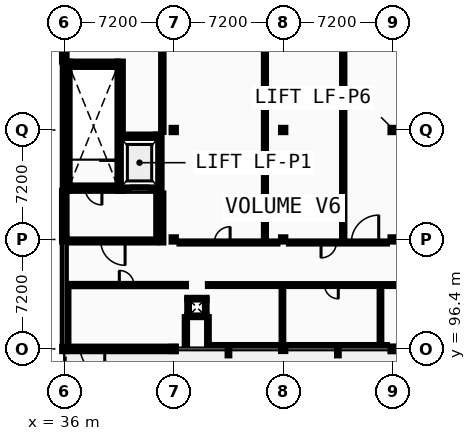
"""IFC4 building model, lengths in metres.
Left out: names, types, materials, properties, quantities, classifications, styles, units other than length and angle.
Written with IfcOpenShell. Run it as: python <this file> out.ifc"""

import sys

from ifc_helpers import new_model, si_unit, direction, frame, frame_2d, origin, origin_2d, place, context, subcontext, project, spatial, rectangle, i_section, extrude, element, fill, save


model = new_model("IFC4")
c1 = context("Model", 3, precision=1e-05, world=origin(), true_north=direction((0.0, 1.0)))
c2 = subcontext(c1, "Body", "Model", "MODEL_VIEW")
j1 = project(units=[si_unit("LENGTHUNIT", "METRE"), si_unit("PLANEANGLEUNIT", "RADIAN")], contexts=[c1])
p1 = place(None, origin())
s1 = spatial("IfcSite", under=j1, at=p1, CompositionType="ELEMENT")
p2 = place(p1, origin())
s2 = spatial("IfcBuilding", under=s1, at=p2, CompositionType="ELEMENT")
p3 = place(p2, frame((0.0, 0.0, 22.8)))
s3 = spatial("IfcBuildingStorey", under=s2, at=p3, CompositionType="ELEMENT", Elevation=22.8)
for number, where, z_axis, x_axis in (
    (1, (36.0, 96.4, 0.0), (0.0, 0.0, 1.0), (1.0, 0.0, 0.0)),
    (2, (36.0, 103.6, 0.0), (0.0, 0.0, 1.0), (1.0, 0.0, 0.0)),
    (3, (43.2, 96.4, 0.0), (0.0, 0.0, 1.0), (1.0, 0.0, 0.0)),
    (4, (43.2, 103.6, 0.0), (0.0, 0.0, 1.0), (1.0, 0.0, 0.0)),
    (5, (43.2, 110.8, 0.0), (0.0, 0.0, 1.0), (1.0, 0.0, 0.0)),
    (6, (50.4, 96.4, 0.0), (0.0, 0.0, 1.0), (1.0, 0.0, 0.0)),
    (7, (50.4, 103.6, 0.0), (0.0, 0.0, 1.0), (1.0, 0.0, 0.0)),
    (8, (50.4, 110.8, 0.0), (0.0, 0.0, 1.0), (1.0, 0.0, 0.0)),
    (9, (57.6, 96.4, 0.0), (0.0, 0.0, 1.0), (1.0, 0.0, 0.0)),
    (10, (57.6, 103.6, 0.0), (0.0, 0.0, 1.0), (1.0, 0.0, 0.0)),
    (11, (57.6, 110.8, 0.0), (0.0, 0.0, 1.0), (1.0, 0.0, 0.0)),
):
    element("IfcColumn", number, at=place(p3, frame(where, z_axis=z_axis, x_axis=x_axis)), inside=s3, PredefinedType="COLUMN", context=c2, shape_type="SweptSolid", body=[
        extrude(i_section(OverallWidth=0.28, OverallDepth=0.28, WebThickness=0.01, FlangeThickness=0.018, FilletRadius=0.024, at=origin_2d()), origin(), (0.0, 0.0, 1.0), 4.4),
    ])
p4 = place(p3, frame((36.0, 96.4, 0.0), z_axis=(0.0, 0.0, 1.0), x_axis=(1.0, 0.0, 0.0)))
e12 = element("IfcWall", 12, at=p4, inside=s3, PredefinedType="STANDARD", context=c2, shape_type="SweptSolid", body=[
    extrude(rectangle(XDim=7.31, YDim=0.3, at=frame_2d((3.655, 0.0))), origin(), (0.0, 0.0, 1.0), 4.035),
])
p5 = place(p4, frame((1.062, 0.0, 0.0)))
e13 = element("IfcOpeningElement", 13, at=p5, cuts=e12, PredefinedType="OPENING", context=c2, shape_type="SweptSolid", body=[
    extrude(rectangle(XDim=1.6, YDim=2.2, at=frame_2d((0.8, 1.1))), frame((0.0, 0.16, 0.0), z_axis=(0.0, -1.0, 0.0), x_axis=(1.0, 0.0, 0.0)), (0.0, 0.0, 1.0), 0.32),
])
p6 = place(p3, frame((57.49, 96.4, 0.0), z_axis=(0.0, 0.0, 1.0), x_axis=(1.0, 0.0, 0.0)))
e14 = element("IfcWall", 14, at=p6, inside=s3, PredefinedType="STANDARD", context=c2, shape_type="SweptSolid", body=[
    extrude(rectangle(XDim=7.31, YDim=0.3, at=frame_2d((3.655, 0.0))), origin(), (0.0, 0.0, 1.0), 4.035),
])
p7 = place(p3, frame((36.0, 106.8, 0.0), z_axis=(0.0, 0.0, 1.0), x_axis=(0.0, -1.0, 0.0)))
e15 = element("IfcWall", 15, at=p7, inside=s3, PredefinedType="STANDARD", context=c2, shape_type="SweptSolid", body=[
    extrude(rectangle(XDim=3.2, YDim=0.3, at=frame_2d((1.6, 0.0))), origin(), (0.0, 0.0, 1.0), 4.11),
])
p8 = place(p7, frame((1.034, 0.0, 0.95)))
e16 = element("IfcOpeningElement", 16, at=p8, cuts=e15, PredefinedType="OPENING", context=c2, shape_type="SweptSolid", body=[
    extrude(rectangle(XDim=1.132, YDim=1.296, at=frame_2d((0.566, 0.648))), frame((0.0, 0.16, 0.0), z_axis=(0.0, -1.0, 0.0), x_axis=(1.0, 0.0, 0.0)), (0.0, 0.0, 1.0), 0.32),
])
p9 = place(p3, frame((36.0, 117.85, 0.0), z_axis=(0.0, 0.0, 1.0), x_axis=(0.0, -1.0, 0.0)))
e17 = element("IfcWall", 17, at=p9, inside=s3, PredefinedType="STANDARD", context=c2, shape_type="SweptSolid", body=[
    extrude(rectangle(XDim=2.55, YDim=0.3, at=frame_2d((1.275, 0.0))), origin(), (0.0, 0.0, 1.0), 4.11),
])
p10 = place(p3, frame((36.0, 96.6, 4.4), z_axis=(0.0, 0.0, 1.0), x_axis=(0.0, 1.0, 0.0)))
e18 = element("IfcWall", 18, at=p10, inside=s3, PredefinedType="PARAPET", context=c2, shape_type="SweptSolid", body=[
    extrude(rectangle(XDim=21.2, YDim=0.2, at=frame_2d((10.6, 0.0))), origin(), (0.0, 0.0, 1.0), 0.55),
])
p11 = place(p3, frame((36.35, 106.975, 0.0), z_axis=(0.0, 0.0, 1.0), x_axis=(1.0, 0.0, 0.0)))
e19 = element("IfcWall", 19, at=p11, inside=s3, PredefinedType="SHEAR", context=c2, shape_type="SweptSolid", body=[
    extrude(rectangle(XDim=3.15, YDim=0.35, at=frame_2d((1.575, 0.0))), origin(), (0.0, 0.0, 1.0), 4.18),
])
p12 = place(p11, frame((1.025, 0.0, 0.0)))
e20 = element("IfcOpeningElement", 20, at=p12, cuts=e19, PredefinedType="OPENING", context=c2, shape_type="SweptSolid", body=[
    extrude(rectangle(XDim=1.1, YDim=2.15, at=frame_2d((0.55, 1.075))), frame((0.0, 0.185, 0.0), z_axis=(0.0, -1.0, 0.0), x_axis=(1.0, 0.0, 0.0)), (0.0, 0.0, 1.0), 0.37),
])
p13 = place(p3, frame((36.35, 115.125, 0.0), z_axis=(0.0, 0.0, 1.0), x_axis=(1.0, 0.0, 0.0)))
e21 = element("IfcWall", 21, at=p13, inside=s3, PredefinedType="SHEAR", context=c2, shape_type="SweptSolid", body=[
    extrude(rectangle(XDim=3.15, YDim=0.35, at=frame_2d((1.575, 0.0))), origin(), (0.0, 0.0, 1.0), 4.18),
])
for number, where, z_axis, x_axis in (
    (22, (36.175, 106.8, 0.0), (0.0, 0.0, 1.0), (0.0, 1.0, 0.0)),
    (23, (39.675, 106.8, 0.0), (0.0, 0.0, 1.0), (0.0, 1.0, 0.0)),
):
    element("IfcWall", number, at=place(p3, frame(where, z_axis=z_axis, x_axis=x_axis)), inside=s3, PredefinedType="SHEAR", context=c2, shape_type="SweptSolid", body=[
        extrude(rectangle(XDim=8.5, YDim=0.35, at=frame_2d((4.25, 0.0))), origin(), (0.0, 0.0, 1.0), 4.18),
    ])
p14 = place(p3, frame((39.85, 106.975, 0.0), z_axis=(0.0, 0.0, 1.0), x_axis=(1.0, 0.0, 0.0)))
e24 = element("IfcWall", 24, at=p14, inside=s3, PredefinedType="SHEAR", context=c2, shape_type="SweptSolid", body=[
    extrude(rectangle(XDim=2.2, YDim=0.35, at=frame_2d((1.1, 0.0))), origin(), (0.0, 0.0, 1.0), 4.18),
])
p15 = place(p14, frame((0.5, 0.0, 0.0)))
e25 = element("IfcOpeningElement", 25, at=p15, cuts=e24, PredefinedType="OPENING", context=c2, shape_type="SweptSolid", body=[
    extrude(rectangle(XDim=1.2, YDim=2.2, at=frame_2d((0.6, 1.1))), frame((0.0, 0.185, 0.0), z_axis=(0.0, -1.0, 0.0), x_axis=(1.0, 0.0, 0.0)), (0.0, 0.0, 1.0), 0.37),
])
p16 = place(p3, frame((39.85, 110.325, 0.0), z_axis=(0.0, 0.0, 1.0), x_axis=(1.0, 0.0, 0.0)))
e26 = element("IfcWall", 26, at=p16, inside=s3, PredefinedType="SHEAR", context=c2, shape_type="SweptSolid", body=[
    extrude(rectangle(XDim=2.2, YDim=0.35, at=frame_2d((1.1, 0.0))), origin(), (0.0, 0.0, 1.0), 4.18),
])
p17 = place(p3, frame((42.225, 106.8, 0.0), z_axis=(0.0, 0.0, 1.0), x_axis=(0.0, 1.0, 0.0)))
e27 = element("IfcWall", 27, at=p17, inside=s3, PredefinedType="SHEAR", context=c2, shape_type="SweptSolid", body=[
    extrude(rectangle(XDim=3.7, YDim=0.35, at=frame_2d((1.85, 0.0))), origin(), (0.0, 0.0, 1.0), 4.18),
])
p18 = place(p3, frame((36.35, 103.5, 0.0), z_axis=(0.0, 0.0, 1.0), x_axis=(1.0, 0.0, 0.0)))
e28 = element("IfcWall", 28, at=p18, inside=s3, PredefinedType="PARTITIONING", context=c2, shape_type="SweptSolid", body=[
    extrude(rectangle(XDim=5.7, YDim=0.2, at=frame_2d((2.85, 0.0))), origin(), (0.0, 0.0, 1.0), 4.035),
])
p19 = place(p18, frame((2.05, 0.0, 0.0)))
e29 = element("IfcOpeningElement", 29, at=p19, cuts=e28, PredefinedType="OPENING", context=c2, shape_type="SweptSolid", body=[
    extrude(rectangle(XDim=1.6, YDim=2.2, at=frame_2d((0.8, 1.1))), frame((0.0, 0.11, 0.0), z_axis=(0.0, -1.0, 0.0), x_axis=(1.0, 0.0, 0.0)), (0.0, 0.0, 1.0), 0.22),
])
p20 = place(p3, frame((42.15, 103.6, 0.0), z_axis=(0.0, 0.0, 1.0), x_axis=(0.0, 1.0, 0.0)))
e30 = element("IfcWall", 30, at=p20, inside=s3, PredefinedType="PARTITIONING", context=c2, shape_type="SweptSolid", body=[
    extrude(rectangle(XDim=3.2, YDim=0.2, at=frame_2d((1.6, 0.0))), origin(), (0.0, 0.0, 1.0), 4.18),
])
for number, where, z_axis, x_axis in (
    (31, (44.09, 98.545, 0.0), (0.0, 0.0, 1.0), (1.0, 0.0, 0.0)),
    (32, (44.09, 99.705, 0.0), (0.0, 0.0, 1.0), (1.0, 0.0, 0.0)),
):
    element("IfcWall", number, at=place(p3, frame(where, z_axis=z_axis, x_axis=x_axis)), inside=s3, PredefinedType="PARTITIONING", context=c2, shape_type="SweptSolid", body=[
        extrude(rectangle(XDim=1.27, YDim=0.11, at=frame_2d((0.635, 0.0))), origin(), (0.0, 0.0, 1.0), 4.18),
    ])
for number, where, z_axis, x_axis in (
    (33, (44.145, 98.6, 0.0), (0.0, 0.0, 1.0), (0.0, 1.0, 0.0)),
    (34, (45.305, 98.6, 0.0), (0.0, 0.0, 1.0), (0.0, 1.0, 0.0)),
):
    element("IfcWall", number, at=place(p3, frame(where, z_axis=z_axis, x_axis=x_axis)), inside=s3, PredefinedType="PARTITIONING", context=c2, shape_type="SweptSolid", body=[
        extrude(rectangle(XDim=1.05, YDim=0.11, at=frame_2d((0.525, 0.0))), origin(), (0.0, 0.0, 1.0), 4.18),
    ])
p21 = place(p3, frame((45.45, 96.6, 0.0), z_axis=(0.0, 0.0, 1.0), x_axis=(1.0, 0.0, 0.0)))
e35 = element("IfcWall", 35, at=p21, inside=s3, PredefinedType="PARTITIONING", context=c2, shape_type="SweptSolid", body=[
    extrude(rectangle(XDim=4.57, YDim=0.11, at=frame_2d((2.285, 0.0))), origin(), (0.0, 0.0, 1.0), 4.035),
])
p22 = place(p3, frame((50.78, 96.6, 0.0), z_axis=(0.0, 0.0, 1.0), x_axis=(1.0, 0.0, 0.0)))
e36 = element("IfcWall", 36, at=p22, inside=s3, PredefinedType="PARTITIONING", context=c2, shape_type="SweptSolid", body=[
    extrude(rectangle(XDim=6.44, YDim=0.11, at=frame_2d((3.22, 0.0))), origin(), (0.0, 0.0, 1.0), 4.035),
])
p23 = place(p3, frame((36.2, 100.6, 0.0), z_axis=(0.0, 0.0, 1.0), x_axis=(1.0, 0.0, 0.0)))
e37 = element("IfcWall", 37, at=p23, inside=s3, PredefinedType="PARTITIONING", context=c2, shape_type="SweptSolid", body=[
    extrude(rectangle(XDim=7.8, YDim=0.15, at=frame_2d((3.9, 0.0))), origin(), (0.0, 0.0, 1.0), 4.18),
])
p24 = place(p23, frame((3.421, 0.0, 0.0)))
e38 = element("IfcOpeningElement", 38, at=p24, cuts=e37, PredefinedType="OPENING", context=c2, shape_type="SweptSolid", body=[
    extrude(rectangle(XDim=0.958, YDim=2.096, at=frame_2d((0.479, 1.048))), frame((0.0, 0.085, 0.0), z_axis=(0.0, -1.0, 0.0), x_axis=(1.0, 0.0, 0.0)), (0.0, 0.0, 1.0), 0.17),
])
p25 = place(p3, frame((45.45, 100.6, 0.0), z_axis=(0.0, 0.0, 1.0), x_axis=(1.0, 0.0, 0.0)))
e39 = element("IfcWall", 39, at=p25, inside=s3, PredefinedType="PARTITIONING", context=c2, shape_type="SweptSolid", body=[
    extrude(rectangle(XDim=19.15, YDim=0.125, at=frame_2d((9.575, 0.0))), origin(), (0.0, 0.0, 1.0), 4.18),
])
p26 = place(p25, frame((0.45, 0.0, 0.0)))
e40 = element("IfcOpeningElement", 40, at=p26, cuts=e39, PredefinedType="OPENING", context=c2, shape_type="SweptSolid", body=[
    extrude(rectangle(XDim=1.0, YDim=2.1, at=frame_2d((0.5, 1.05))), frame((0.0, 0.073, 0.0), z_axis=(0.0, -1.0, 0.0), x_axis=(1.0, 0.0, 0.0)), (0.0, 0.0, 1.0), 0.145),
])
p27 = place(p25, frame((7.675, 0.0, 0.0)))
e41 = element("IfcOpeningElement", 41, at=p27, cuts=e39, PredefinedType="OPENING", context=c2, shape_type="SweptSolid", body=[
    extrude(rectangle(XDim=0.9, YDim=2.1, at=frame_2d((0.45, 1.05))), frame((0.0, 0.073, 0.0), z_axis=(0.0, -1.0, 0.0), x_axis=(1.0, 0.0, 0.0)), (0.0, 0.0, 1.0), 0.145),
])
p28 = place(p25, frame((14.758, 0.0, 0.0)))
e42 = element("IfcOpeningElement", 42, at=p28, cuts=e39, PredefinedType="OPENING", context=c2, shape_type="SweptSolid", body=[
    extrude(rectangle(XDim=0.984, YDim=2.096, at=frame_2d((0.492, 1.048))), frame((0.0, 0.073, 0.0), z_axis=(0.0, -1.0, 0.0), x_axis=(1.0, 0.0, 0.0)), (0.0, 0.0, 1.0), 0.145),
])
p29 = place(p3, frame((43.58, 103.4, 0.0), z_axis=(0.0, 0.0, 1.0), x_axis=(1.0, 0.0, 0.0)))
e43 = element("IfcWall", 43, at=p29, inside=s3, PredefinedType="PARTITIONING", context=c2, shape_type="SweptSolid", body=[
    extrude(rectangle(XDim=6.44, YDim=0.135, at=frame_2d((3.22, 0.0))), origin(), (0.0, 0.0, 1.0), 4.035),
])
p30 = place(p29, frame((2.292, 0.0, 0.0)))
e44 = element("IfcOpeningElement", 44, at=p30, cuts=e43, PredefinedType="OPENING", context=c2, shape_type="SweptSolid", body=[
    extrude(rectangle(XDim=1.036, YDim=2.096, at=frame_2d((0.518, 1.048))), frame((0.0, 0.078, 0.0), z_axis=(0.0, -1.0, 0.0), x_axis=(1.0, 0.0, 0.0)), (0.0, 0.0, 1.0), 0.155),
])
p31 = place(p3, frame((50.78, 103.4, 0.0), z_axis=(0.0, 0.0, 1.0), x_axis=(1.0, 0.0, 0.0)))
e45 = element("IfcWall", 45, at=p31, inside=s3, PredefinedType="PARTITIONING", context=c2, shape_type="SweptSolid", body=[
    extrude(rectangle(XDim=6.44, YDim=0.135, at=frame_2d((3.22, 0.0))), origin(), (0.0, 0.0, 1.0), 4.035),
])
p32 = place(p31, frame((4.105, 0.0, 0.0)))
e46 = element("IfcOpeningElement", 46, at=p32, cuts=e45, PredefinedType="OPENING", context=c2, shape_type="SweptSolid", body=[
    extrude(rectangle(XDim=1.8, YDim=2.3, at=frame_2d((0.9, 1.15))), frame((0.0, 0.078, 0.0), z_axis=(0.0, -1.0, 0.0), x_axis=(1.0, 0.0, 0.0)), (0.0, 0.0, 1.0), 0.155),
])
p33 = place(p31, frame((2.11, 0.0, 0.0)))
e47 = element("IfcOpeningElement", 47, at=p33, cuts=e45, PredefinedType="OPENING", context=c2, shape_type="SweptSolid", body=[
    extrude(rectangle(XDim=1.01, YDim=2.096, at=frame_2d((0.505, 1.048))), frame((0.0, 0.078, 0.0), z_axis=(0.0, -1.0, 0.0), x_axis=(1.0, 0.0, 0.0)), (0.0, 0.0, 1.0), 0.155),
])
p34 = place(p3, frame((36.2, 96.78, 0.0), z_axis=(0.0, 0.0, 1.0), x_axis=(0.0, 1.0, 0.0)))
e48 = element("IfcWall", 48, at=p34, inside=s3, PredefinedType="PARTITIONING", context=c2, shape_type="SweptSolid", body=[
    extrude(rectangle(XDim=3.745, YDim=0.142, at=frame_2d((1.873, 0.0))), origin(), (0.0, 0.0, 1.0), 4.11),
])
p35 = place(p3, frame((42.45, 103.4, 0.0), z_axis=(0.0, 0.0, 1.0), x_axis=(0.0, 1.0, 0.0)))
e49 = element("IfcWall", 49, at=p35, inside=s3, PredefinedType="PARTITIONING", context=c2, shape_type="SweptSolid", body=[
    extrude(rectangle(XDim=3.225, YDim=0.135, at=frame_2d((1.613, 0.0))), origin(), (0.0, 0.0, 1.0), 4.18),
])
p36 = place(p3, frame((42.45, 110.675, 0.0), z_axis=(0.0, 0.0, 1.0), x_axis=(0.0, 1.0, 0.0)))
e50 = element("IfcWall", 50, at=p36, inside=s3, PredefinedType="PARTITIONING", context=c2, shape_type="SweptSolid", body=[
    extrude(rectangle(XDim=7.125, YDim=0.16, at=frame_2d((3.562, 0.0))), origin(), (0.0, 0.0, 1.0), 4.18),
])
p37 = place(p3, frame((44.0, 96.6, 0.0), z_axis=(0.0, 0.0, 1.0), x_axis=(0.0, 1.0, 0.0)))
e51 = element("IfcWall", 51, at=p37, inside=s3, PredefinedType="PARTITIONING", context=c2, shape_type="SweptSolid", body=[
    extrude(rectangle(XDim=1.89, YDim=0.15, at=frame_2d((0.945, 0.0))), origin(), (0.0, 0.0, 1.0), 4.18),
])
p38 = place(p3, frame((45.45, 96.655, 0.0), z_axis=(0.0, 0.0, 1.0), x_axis=(0.0, 1.0, 0.0)))
e52 = element("IfcWall", 52, at=p38, inside=s3, PredefinedType="PARTITIONING", context=c2, shape_type="SweptSolid", body=[
    extrude(rectangle(XDim=1.835, YDim=0.11, at=frame_2d((0.917, 0.0))), origin(), (0.0, 0.0, 1.0), 4.18),
])
p39 = place(p3, frame((49.2, 103.468, 0.0), z_axis=(0.0, 0.0, 1.0), x_axis=(0.0, 1.0, 0.0)))
e53 = element("IfcWall", 53, at=p39, inside=s3, PredefinedType="PARTITIONING", context=c2, shape_type="SweptSolid", body=[
    extrude(rectangle(XDim=14.333, YDim=0.135, at=frame_2d((7.166, 0.0))), origin(), (0.0, 0.0, 1.0), 4.18),
])
p40 = place(p3, frame((50.35, 96.78, 0.0), z_axis=(0.0, 0.0, 1.0), x_axis=(0.0, 1.0, 0.0)))
e54 = element("IfcWall", 54, at=p40, inside=s3, PredefinedType="PARTITIONING", context=c2, shape_type="SweptSolid", body=[
    extrude(rectangle(XDim=3.758, YDim=0.11, at=frame_2d((1.879, 0.0))), origin(), (0.0, 0.0, 1.0), 4.18),
])
p41 = place(p3, frame((54.35, 103.468, 0.0), z_axis=(0.0, 0.0, 1.0), x_axis=(0.0, 1.0, 0.0)))
e55 = element("IfcWall", 55, at=p41, inside=s3, PredefinedType="PARTITIONING", context=c2, shape_type="SweptSolid", body=[
    extrude(rectangle(XDim=14.333, YDim=0.15, at=frame_2d((7.166, 0.0))), origin(), (0.0, 0.0, 1.0), 4.18),
])
p42 = place(p3, frame((56.8, 96.655, 0.0), z_axis=(0.0, 0.0, 1.0), x_axis=(0.0, 1.0, 0.0)))
e56 = element("IfcWall", 56, at=p42, inside=s3, PredefinedType="PARTITIONING", context=c2, shape_type="SweptSolid", body=[
    extrude(rectangle(XDim=3.883, YDim=0.11, at=frame_2d((1.941, 0.0))), origin(), (0.0, 0.0, 1.0), 4.18),
])
p43 = place(p8, origin())
e57 = element("IfcWindow", 57, at=p43, inside=s3, PartitioningType="SINGLE_PANEL", PredefinedType="WINDOW", context=c2, shape_type="SweptSolid", body=[
    extrude(rectangle(XDim=1.132, YDim=1.296, at=frame_2d((0.566, 0.648))), frame((0.0, 0.03, 0.0), z_axis=(0.0, -1.0, 0.0), x_axis=(1.0, 0.0, 0.0)), (0.0, 0.0, 1.0), 0.06),
])
fill(e16, e57)
p44 = place(p5, origin())
e58 = element("IfcDoor", 58, at=p44, inside=s3, OperationType="DOUBLE_DOOR_SINGLE_SWING", PredefinedType="DOOR", context=c2, shape_type="SweptSolid", body=[
    extrude(rectangle(XDim=1.6, YDim=2.2, at=frame_2d((0.8, 1.1))), frame((0.0, 0.025, 0.0), z_axis=(0.0, -1.0, 0.0), x_axis=(1.0, 0.0, 0.0)), (0.0, 0.0, 1.0), 0.05),
])
fill(e13, e58)
p45 = place(p12, origin())
e59 = element("IfcDoor", 59, at=p45, inside=s3, OperationType="SINGLE_SWING_RIGHT", PredefinedType="DOOR", context=c2, shape_type="SweptSolid", body=[
    extrude(rectangle(XDim=1.1, YDim=2.15, at=frame_2d((0.55, 1.075))), frame((0.0, 0.025, 0.0), z_axis=(0.0, -1.0, 0.0), x_axis=(1.0, 0.0, 0.0)), (0.0, 0.0, 1.0), 0.05),
])
fill(e20, e59)
p46 = place(p15, origin())
e60 = element("IfcDoor", 60, at=p46, inside=s3, OperationType="SLIDING_TO_RIGHT", PredefinedType="DOOR", context=c2, shape_type="SweptSolid", body=[
    extrude(rectangle(XDim=1.2, YDim=2.2, at=frame_2d((0.6, 1.1))), frame((0.0, 0.025, 0.0), z_axis=(0.0, -1.0, 0.0), x_axis=(1.0, 0.0, 0.0)), (0.0, 0.0, 1.0), 0.05),
])
fill(e25, e60)
p47 = place(p19, origin())
e61 = element("IfcDoor", 61, at=p47, inside=s3, OperationType="DOUBLE_DOOR_SINGLE_SWING", PredefinedType="DOOR", context=c2, shape_type="SweptSolid", body=[
    extrude(rectangle(XDim=1.6, YDim=2.2, at=frame_2d((0.8, 1.1))), frame((0.0, 0.025, 0.0), z_axis=(0.0, -1.0, 0.0), x_axis=(1.0, 0.0, 0.0)), (0.0, 0.0, 1.0), 0.05),
])
fill(e29, e61)
p48 = place(p26, origin())
e62 = element("IfcDoor", 62, at=p48, inside=s3, OperationType="SLIDING_TO_LEFT", PredefinedType="DOOR", context=c2, shape_type="SweptSolid", body=[
    extrude(rectangle(XDim=1.0, YDim=2.1, at=frame_2d((0.5, 1.05))), frame((0.0, 0.025, 0.0), z_axis=(0.0, -1.0, 0.0), x_axis=(1.0, 0.0, 0.0)), (0.0, 0.0, 1.0), 0.05),
])
fill(e40, e62)
p49 = place(p27, origin())
e63 = element("IfcDoor", 63, at=p49, inside=s3, OperationType="SINGLE_SWING_RIGHT", PredefinedType="DOOR", context=c2, shape_type="SweptSolid", body=[
    extrude(rectangle(XDim=0.9, YDim=2.1, at=frame_2d((0.45, 1.05))), frame((0.0, 0.025, 0.0), z_axis=(0.0, -1.0, 0.0), x_axis=(1.0, 0.0, 0.0)), (0.0, 0.0, 1.0), 0.05),
])
fill(e41, e63)
p50 = place(p24, origin())
e64 = element("IfcDoor", 64, at=p50, inside=s3, OperationType="SINGLE_SWING_LEFT", PredefinedType="DOOR", context=c2, shape_type="SweptSolid", body=[
    extrude(rectangle(XDim=0.958, YDim=2.096, at=frame_2d((0.479, 1.048))), frame((0.0, 0.025, 0.0), z_axis=(0.0, -1.0, 0.0), x_axis=(1.0, 0.0, 0.0)), (0.0, 0.0, 1.0), 0.05),
])
fill(e38, e64)
p51 = place(p32, frame((1.8, 0.0, 0.0), z_axis=(0.0, 0.0, 1.0), x_axis=(-1.0, 0.0, 0.0)))
e65 = element("IfcDoor", 65, at=p51, inside=s3, OperationType="DOUBLE_DOOR_SINGLE_SWING", PredefinedType="DOOR", context=c2, shape_type="SweptSolid", body=[
    extrude(rectangle(XDim=1.8, YDim=2.3, at=frame_2d((0.9, 1.15))), frame((0.0, 0.025, 0.0), z_axis=(0.0, -1.0, 0.0), x_axis=(1.0, 0.0, 0.0)), (0.0, 0.0, 1.0), 0.05),
])
fill(e46, e65)
p52 = place(p33, frame((1.01, 0.0, 0.0), z_axis=(0.0, 0.0, 1.0), x_axis=(-1.0, 0.0, 0.0)))
e66 = element("IfcDoor", 66, at=p52, inside=s3, OperationType="SINGLE_SWING_LEFT", PredefinedType="DOOR", context=c2, shape_type="SweptSolid", body=[
    extrude(rectangle(XDim=1.01, YDim=2.096, at=frame_2d((0.505, 1.048))), frame((0.0, 0.025, 0.0), z_axis=(0.0, -1.0, 0.0), x_axis=(1.0, 0.0, 0.0)), (0.0, 0.0, 1.0), 0.05),
])
fill(e47, e66)
p53 = place(p30, frame((1.036, 0.0, 0.0), z_axis=(0.0, 0.0, 1.0), x_axis=(-1.0, 0.0, 0.0)))
e67 = element("IfcDoor", 67, at=p53, inside=s3, OperationType="SINGLE_SWING_RIGHT", PredefinedType="DOOR", context=c2, shape_type="SweptSolid", body=[
    extrude(rectangle(XDim=1.036, YDim=2.096, at=frame_2d((0.518, 1.048))), frame((0.0, 0.025, 0.0), z_axis=(0.0, -1.0, 0.0), x_axis=(1.0, 0.0, 0.0)), (0.0, 0.0, 1.0), 0.05),
])
fill(e44, e67)
save(model, sys.argv[1])
